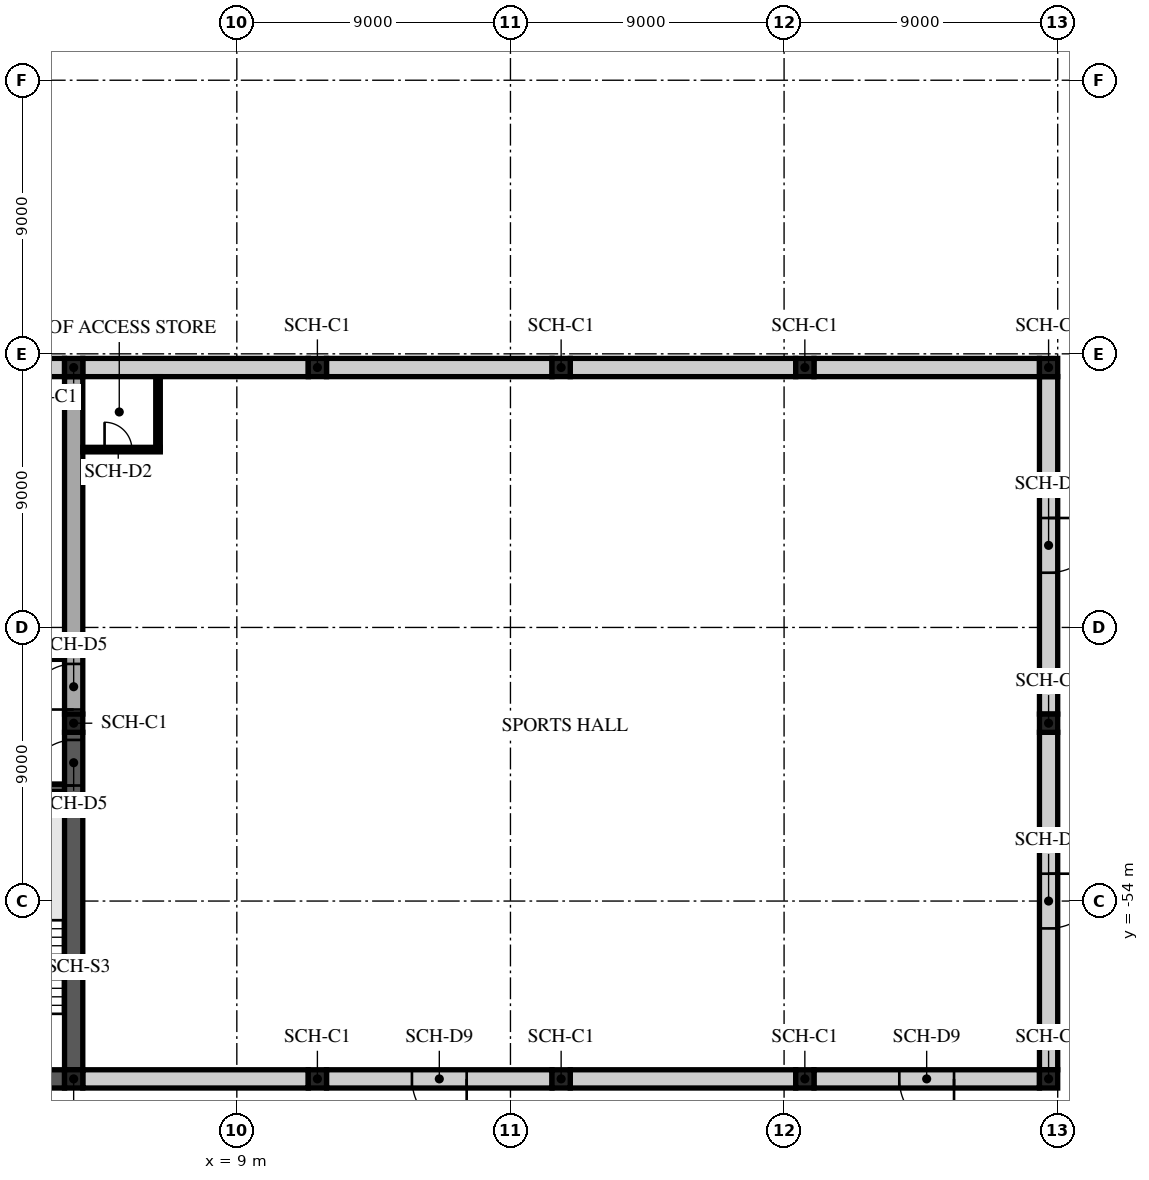
"""IFC4 building model, lengths in metres.
Left out: names, types, materials, properties, quantities, classifications, styles, units other than length and angle.
Written with IfcOpenShell. Run it as: python <this file> out.ifc"""

import sys

from ifc_helpers import new_model, si_unit, direction, frame, frame_2d, origin, origin_2d, place, context, subcontext, project, spatial, rectangle, extrude, element, fill, save


model = new_model("IFC4")
c1 = context("Model", 3, precision=1e-05, world=origin(), true_north=direction((0.0, 1.0)))
c2 = subcontext(c1, "Body", "Model", "MODEL_VIEW")
j1 = project(units=[si_unit("LENGTHUNIT", "METRE"), si_unit("PLANEANGLEUNIT", "RADIAN")], contexts=[c1])
p1 = place(None, origin())
s1 = spatial("IfcSite", under=j1, at=p1, CompositionType="ELEMENT")
p2 = place(p1, origin())
s2 = spatial("IfcBuilding", under=s1, at=p2, CompositionType="ELEMENT")
p3 = place(p2, origin())
s3 = spatial("IfcBuildingStorey", under=s2, at=p3, CompositionType="ELEMENT", Elevation=0.0)
p4 = place(p3, frame((9.0, -34.6, 0.0), z_axis=(0.0, 0.0, 1.0), x_axis=(1.0, 0.0, 0.0)))
e1 = element("IfcColumn", 1, at=p4, inside=s3, PredefinedType="COLUMN", context=c2, shape_type="SweptSolid", body=[
    extrude(rectangle(XDim=0.675, YDim=0.675, at=origin_2d()), origin(), (0.0, 0.0, 1.0), 4.5),
])
p5 = place(p3, frame((9.0, -27.0, 0.0), z_axis=(0.0, 0.0, 1.0), x_axis=(1.0, 0.0, 0.0)))
e2 = element("IfcColumn", 2, at=p5, inside=s3, PredefinedType="COLUMN", context=c2, shape_type="SweptSolid", body=[
    extrude(rectangle(XDim=0.825, YDim=0.825, at=origin_2d()), origin(), (0.0, 0.0, 1.0), 4.5),
])
p6 = place(p3, frame((18.0, -34.6, 0.0), z_axis=(0.0, 0.0, 1.0), x_axis=(1.0, 0.0, 0.0)))
e3 = element("IfcColumn", 3, at=p6, inside=s3, PredefinedType="COLUMN", context=c2, shape_type="SweptSolid", body=[
    extrude(rectangle(XDim=0.725, YDim=0.725, at=origin_2d()), origin(), (0.0, 0.0, 1.0), 4.5),
])
p7 = place(p3, frame((27.0, -34.6, 0.0), z_axis=(0.0, 0.0, 1.0), x_axis=(1.0, 0.0, 0.0)))
e4 = element("IfcColumn", 4, at=p7, inside=s3, PredefinedType="COLUMN", context=c2, shape_type="SweptSolid", body=[
    extrude(rectangle(XDim=0.625, YDim=0.625, at=origin_2d()), origin(), (0.0, 0.0, 1.0), 4.5),
])
p8 = place(p3, frame((27.0, -27.0, 0.0), z_axis=(0.0, 0.0, 1.0), x_axis=(1.0, 0.0, 0.0)))
e5 = element("IfcColumn", 5, at=p8, inside=s3, PredefinedType="COLUMN", context=c2, shape_type="SweptSolid", body=[
    extrude(rectangle(XDim=0.875, YDim=0.875, at=origin_2d()), origin(), (0.0, 0.0, 1.0), 4.5),
])
p9 = place(p3, frame((34.6, -27.0, 0.0), z_axis=(0.0, 0.0, 1.0), x_axis=(1.0, 0.0, 0.0)))
e6 = element("IfcColumn", 6, at=p9, inside=s3, PredefinedType="COLUMN", context=c2, shape_type="SweptSolid", body=[
    extrude(rectangle(XDim=0.7, YDim=0.7, at=origin_2d()), origin(), (0.0, 0.0, 1.0), 4.5),
])
p10 = place(p3, frame((3.681, -27.253, 0.0), z_axis=(0.0, 0.0, 1.0), x_axis=(0.991001197216, 0.133853005627, 0.0)))
e7 = element("IfcColumn", 7, at=p10, inside=s3, PredefinedType="COLUMN", context=c2, shape_type="SweptSolid", body=[
    extrude(rectangle(XDim=1.6, YDim=1.6, at=origin_2d()), origin(), (0.0, 0.0, 1.0), 4.5),
])
p11 = place(p3, frame((17.307, -25.412, 0.0), z_axis=(0.0, 0.0, 1.0), x_axis=(0.991001197216, 0.133853005627, 0.0)))
e8 = element("IfcColumn", 8, at=p11, inside=s3, PredefinedType="COLUMN", context=c2, shape_type="SweptSolid", body=[
    extrude(rectangle(XDim=1.575, YDim=1.575, at=origin_2d()), origin(), (0.0, 0.0, 1.0), 4.5),
])
p12 = place(p3, frame((17.925, -27.0, 0.0), z_axis=(0.0, 0.0, 1.0), x_axis=(1.0, 0.0, 0.0)))
e9 = element("IfcWall", 9, at=p12, inside=s3, PredefinedType="PARTITIONING", context=c2, shape_type="SweptSolid", body=[
    extrude(rectangle(XDim=8.575, YDim=0.15, at=frame_2d((4.288, 0.0))), origin(), (0.0, 0.0, 1.0), 4.1),
])
p13 = place(p12, frame((4.075, 0.0, 0.0)))
e10 = element("IfcOpeningElement", 10, at=p13, cuts=e9, PredefinedType="OPENING", context=c2, shape_type="SweptSolid", body=[
    extrude(rectangle(XDim=1.0, YDim=2.1, at=frame_2d((0.5, 1.05))), frame((0.0, 0.085, 0.0), z_axis=(0.0, -1.0, 0.0), x_axis=(1.0, 0.0, 0.0)), (0.0, 0.0, 1.0), 0.17),
])
p14 = place(p3, frame((27.5, -27.0, 0.0), z_axis=(0.0, 0.0, 1.0), x_axis=(1.0, 0.0, 0.0)))
e11 = element("IfcWall", 11, at=p14, inside=s3, PredefinedType="PARTITIONING", context=c2, shape_type="SweptSolid", body=[
    extrude(rectangle(XDim=6.6, YDim=0.1, at=frame_2d((3.3, 0.0))), origin(), (0.0, 0.0, 1.0), 4.1),
])
p15 = place(p3, frame((35.1, -27.0, 0.0), z_axis=(0.0, 0.0, 1.0), x_axis=(1.0, 0.0, 0.0)))
e12 = element("IfcWall", 12, at=p15, inside=s3, PredefinedType="PARTITIONING", context=c2, shape_type="SweptSolid", body=[
    extrude(rectangle(XDim=0.9, YDim=0.1, at=frame_2d((0.45, 0.0))), origin(), (0.0, 0.0, 1.0), 4.1),
])
p16 = place(p3, frame((13.5, -36.0, 0.0), z_axis=(0.0, 0.0, 1.0), x_axis=(0.0, 1.0, 0.0)))
e13 = element("IfcWall", 13, at=p16, inside=s3, PredefinedType="PARTITIONING", context=c2, shape_type="SweptSolid", body=[
    extrude(rectangle(XDim=17.925, YDim=0.1, at=frame_2d((8.962, 0.0))), origin(), (0.0, 0.0, 1.0), 4.1),
])
p17 = place(p3, frame((18.0, -36.0, 0.0), z_axis=(0.0, 0.0, 1.0), x_axis=(0.0, 1.0, 0.0)))
e14 = element("IfcWall", 14, at=p17, inside=s3, PredefinedType="PARTITIONING", context=c2, shape_type="SweptSolid", body=[
    extrude(rectangle(XDim=0.9, YDim=0.1, at=frame_2d((0.45, 0.0))), origin(), (0.0, 0.0, 1.0), 4.1),
])
p18 = place(p3, frame((18.0, -34.1, 0.0), z_axis=(0.0, 0.0, 1.0), x_axis=(0.0, 1.0, 0.0)))
e15 = element("IfcWall", 15, at=p18, inside=s3, PredefinedType="PARTITIONING", context=c2, shape_type="SweptSolid", body=[
    extrude(rectangle(XDim=7.025, YDim=0.1, at=frame_2d((3.513, 0.0))), origin(), (0.0, 0.0, 1.0), 4.1),
])
p19 = place(p3, frame((18.0, -26.925, 0.0), z_axis=(0.0, 0.0, 1.0), x_axis=(0.0, 1.0, 0.0)))
e16 = element("IfcWall", 16, at=p19, inside=s3, PredefinedType="PARTITIONING", context=c2, shape_type="SweptSolid", body=[
    extrude(rectangle(XDim=0.782, YDim=0.15, at=frame_2d((0.391, 0.0))), origin(), (0.0, 0.0, 1.0), 4.1),
])
p20 = place(p3, frame((27.0, -26.5, 0.0), z_axis=(0.0, 0.0, 1.0), x_axis=(0.0, 1.0, 0.0)))
e17 = element("IfcWall", 17, at=p20, inside=s3, PredefinedType="PARTITIONING", context=c2, shape_type="SweptSolid", body=[
    extrude(rectangle(XDim=4.284, YDim=0.15, at=frame_2d((2.142, 0.0))), origin(), (0.0, 0.0, 1.0), 4.1),
])
for number, where, z_axis, x_axis in (
    (18, (3.633, -59.85, -0.2), (0.0, 0.0, 1.0), (1.0, 0.0, 0.0)),
    (19, (3.633, -48.15, -0.2), (0.0, 0.0, 1.0), (1.0, 0.0, 0.0)),
    (20, (3.633, -36.45, -0.2), (0.0, 0.0, 1.0), (1.0, 0.0, 0.0)),
    (21, (11.65, -59.85, -0.2), (0.0, 0.0, 1.0), (1.0, 0.0, 0.0)),
    (22, (11.65, -36.45, -0.2), (0.0, 0.0, 1.0), (1.0, 0.0, 0.0)),
    (23, (19.667, -59.85, -0.2), (0.0, 0.0, 1.0), (1.0, 0.0, 0.0)),
    (24, (19.667, -36.45, -0.2), (0.0, 0.0, 1.0), (1.0, 0.0, 0.0)),
    (25, (27.683, -59.85, -0.2), (0.0, 0.0, 1.0), (1.0, 0.0, 0.0)),
    (26, (27.683, -36.45, -0.2), (0.0, 0.0, 1.0), (1.0, 0.0, 0.0)),
    (27, (35.7, -59.85, -0.2), (0.0, 0.0, 1.0), (1.0, 0.0, 0.0)),
    (28, (35.7, -48.15, -0.2), (0.0, 0.0, 1.0), (1.0, 0.0, 0.0)),
    (29, (35.7, -36.45, -0.2), (0.0, 0.0, 1.0), (1.0, 0.0, 0.0)),
):
    element("IfcColumn", number, at=place(p3, frame(where, z_axis=z_axis, x_axis=x_axis)), inside=s3, PredefinedType="COLUMN", context=c2, shape_type="SweptSolid", body=[
        extrude(rectangle(XDim=0.6, YDim=0.6, at=origin_2d()), origin(), (0.0, 0.0, 1.0), 4.7),
    ])
p21 = place(p3, frame((-0.772, -50.275, 0.0), z_axis=(0.0, 0.0, 1.0), x_axis=(1.0, 0.0, 0.0)))
e30 = element("IfcWall", 30, at=p21, inside=s3, PredefinedType="SHEAR", context=c2, shape_type="SweptSolid", body=[
    extrude(rectangle(XDim=4.105, YDim=0.25, at=frame_2d((2.052, 0.0))), origin(), (0.0, 0.0, 1.0), 4.1),
])
p22 = place(p3, frame((-1.233, -45.975, 0.0), z_axis=(0.0, 0.0, 1.0), x_axis=(1.0, 0.0, 0.0)))
e31 = element("IfcWall", 31, at=p22, inside=s3, PredefinedType="PARTITIONING", context=c2, shape_type="SweptSolid", body=[
    extrude(rectangle(XDim=4.566, YDim=0.15, at=frame_2d((2.283, 0.0))), origin(), (0.0, 0.0, 1.0), 4.1),
])
p23 = place(p22, frame((1.87, 0.0, 0.0)))
e32 = element("IfcOpeningElement", 32, at=p23, cuts=e31, PredefinedType="OPENING", context=c2, shape_type="SweptSolid", body=[
    extrude(rectangle(XDim=0.9, YDim=2.1, at=frame_2d((0.45, 1.05))), frame((0.0, 0.085, 0.0), z_axis=(0.0, -1.0, 0.0), x_axis=(1.0, 0.0, 0.0)), (0.0, 0.0, 1.0), 0.17),
])
p24 = place(p3, frame((-4.083, -36.45, -0.2), z_axis=(0.0, 0.0, 1.0), x_axis=(1.0, 0.0, 0.0)))
e33 = element("IfcWall", 33, at=p24, inside=s3, PredefinedType="STANDARD", context=c2, shape_type="SweptSolid", body=[
    extrude(rectangle(XDim=7.417, YDim=0.6, at=frame_2d((3.708, 0.0))), origin(), (0.0, 0.0, 1.0), 4.3),
])
for number, where, z_axis, x_axis in (
    (34, (3.933, -36.45, -0.2), (0.0, 0.0, 1.0), (1.0, 0.0, 0.0)),
    (35, (11.95, -36.45, -0.2), (0.0, 0.0, 1.0), (1.0, 0.0, 0.0)),
):
    element("IfcWall", number, at=place(p3, frame(where, z_axis=z_axis, x_axis=x_axis)), inside=s3, PredefinedType="SOLIDWALL", context=c2, shape_type="SweptSolid", body=[
        extrude(rectangle(XDim=7.417, YDim=0.6, at=frame_2d((3.708, 0.0))), origin(), (0.0, 0.0, 1.0), 4.7),
    ])
for number, where, z_axis, x_axis in (
    (36, (19.967, -36.45, -0.2), (0.0, 0.0, 1.0), (1.0, 0.0, 0.0)),
    (37, (27.983, -36.45, -0.2), (0.0, 0.0, 1.0), (1.0, 0.0, 0.0)),
):
    element("IfcWall", number, at=place(p3, frame(where, z_axis=z_axis, x_axis=x_axis)), inside=s3, PredefinedType="SOLIDWALL", context=c2, shape_type="SweptSolid", body=[
        extrude(rectangle(XDim=7.417, YDim=0.6, at=frame_2d((3.708, 0.0))), origin(), (0.0, 0.0, 1.0), 4.7),
    ])
p25 = place(p3, frame((35.7, -36.75, -0.2), z_axis=(0.0, 0.0, 1.0), x_axis=(0.0, -1.0, 0.0)))
e38 = element("IfcWall", 38, at=p25, inside=s3, PredefinedType="SOLIDWALL", context=c2, shape_type="SweptSolid", body=[
    extrude(rectangle(XDim=11.1, YDim=0.6, at=frame_2d((5.55, 0.0))), origin(), (0.0, 0.0, 1.0), 4.7),
])
p26 = place(p25, frame((4.65, 0.0, 0.2)))
e39 = element("IfcOpeningElement", 39, at=p26, cuts=e38, PredefinedType="OPENING", context=c2, shape_type="SweptSolid", body=[
    extrude(rectangle(XDim=1.8, YDim=2.4, at=frame_2d((0.9, 1.2))), frame((0.0, 0.31, 0.0), z_axis=(0.0, -1.0, 0.0), x_axis=(1.0, 0.0, 0.0)), (0.0, 0.0, 1.0), 0.62),
])
p27 = place(p3, frame((35.7, -48.45, -0.2), z_axis=(0.0, 0.0, 1.0), x_axis=(0.0, -1.0, 0.0)))
e40 = element("IfcWall", 40, at=p27, inside=s3, PredefinedType="SOLIDWALL", context=c2, shape_type="SweptSolid", body=[
    extrude(rectangle(XDim=11.1, YDim=0.6, at=frame_2d((5.55, 0.0))), origin(), (0.0, 0.0, 1.0), 4.7),
])
p28 = place(p27, frame((4.65, 0.0, 0.2)))
e41 = element("IfcOpeningElement", 41, at=p28, cuts=e40, PredefinedType="OPENING", context=c2, shape_type="SweptSolid", body=[
    extrude(rectangle(XDim=1.8, YDim=2.4, at=frame_2d((0.9, 1.2))), frame((0.0, 0.31, 0.0), z_axis=(0.0, -1.0, 0.0), x_axis=(1.0, 0.0, 0.0)), (0.0, 0.0, 1.0), 0.62),
])
p29 = place(p3, frame((35.4, -59.85, -0.2), z_axis=(0.0, 0.0, 1.0), x_axis=(-1.0, 0.0, 0.0)))
e42 = element("IfcWall", 42, at=p29, inside=s3, PredefinedType="SOLIDWALL", context=c2, shape_type="SweptSolid", body=[
    extrude(rectangle(XDim=7.417, YDim=0.6, at=frame_2d((3.708, 0.0))), origin(), (0.0, 0.0, 1.0), 4.7),
])
p30 = place(p29, frame((2.81, 0.0, 0.2)))
e43 = element("IfcOpeningElement", 43, at=p30, cuts=e42, PredefinedType="OPENING", context=c2, shape_type="SweptSolid", body=[
    extrude(rectangle(XDim=1.8, YDim=2.4, at=frame_2d((0.9, 1.2))), frame((0.0, 0.31, 0.0), z_axis=(0.0, -1.0, 0.0), x_axis=(1.0, 0.0, 0.0)), (0.0, 0.0, 1.0), 0.62),
])
p31 = place(p3, frame((27.383, -59.85, -0.2), z_axis=(0.0, 0.0, 1.0), x_axis=(-1.0, 0.0, 0.0)))
e44 = element("IfcWall", 44, at=p31, inside=s3, PredefinedType="SOLIDWALL", context=c2, shape_type="SweptSolid", body=[
    extrude(rectangle(XDim=7.417, YDim=0.6, at=frame_2d((3.708, 0.0))), origin(), (0.0, 0.0, 1.0), 4.7),
])
p32 = place(p3, frame((19.367, -59.85, -0.2), z_axis=(0.0, 0.0, 1.0), x_axis=(-1.0, 0.0, 0.0)))
e45 = element("IfcWall", 45, at=p32, inside=s3, PredefinedType="SOLIDWALL", context=c2, shape_type="SweptSolid", body=[
    extrude(rectangle(XDim=7.417, YDim=0.6, at=frame_2d((3.708, 0.0))), origin(), (0.0, 0.0, 1.0), 4.7),
])
p33 = place(p32, frame((2.807, 0.0, 0.2)))
e46 = element("IfcOpeningElement", 46, at=p33, cuts=e45, PredefinedType="OPENING", context=c2, shape_type="SweptSolid", body=[
    extrude(rectangle(XDim=1.8, YDim=2.4, at=frame_2d((0.9, 1.2))), frame((0.0, 0.31, 0.0), z_axis=(0.0, -1.0, 0.0), x_axis=(1.0, 0.0, 0.0)), (0.0, 0.0, 1.0), 0.62),
])
p34 = place(p3, frame((11.35, -59.85, -0.2), z_axis=(0.0, 0.0, 1.0), x_axis=(-1.0, 0.0, 0.0)))
e47 = element("IfcWall", 47, at=p34, inside=s3, PredefinedType="SOLIDWALL", context=c2, shape_type="SweptSolid", body=[
    extrude(rectangle(XDim=7.417, YDim=0.6, at=frame_2d((3.708, 0.0))), origin(), (0.0, 0.0, 1.0), 4.7),
])
p35 = place(p3, frame((3.333, -59.85, -0.2), z_axis=(0.0, 0.0, 1.0), x_axis=(-1.0, 0.0, 0.0)))
e48 = element("IfcWall", 48, at=p35, inside=s3, PredefinedType="STANDARD", context=c2, shape_type="SweptSolid", body=[
    extrude(rectangle(XDim=7.417, YDim=0.6, at=frame_2d((3.708, 0.0))), origin(), (0.0, 0.0, 1.0), 4.3),
])
p36 = place(p35, frame((1.39, 0.0, 0.2)))
e49 = element("IfcOpeningElement", 49, at=p36, cuts=e48, PredefinedType="OPENING", context=c2, shape_type="SweptSolid", body=[
    extrude(rectangle(XDim=1.2, YDim=2.1, at=frame_2d((0.6, 1.05))), frame((0.0, 0.31, 0.0), z_axis=(0.0, -1.0, 0.0), x_axis=(1.0, 0.0, 0.0)), (0.0, 0.0, 1.0), 0.62),
])
p37 = place(p3, frame((3.633, -59.55, -0.2), z_axis=(0.0, 0.0, 1.0), x_axis=(0.0, 1.0, 0.0)))
e50 = element("IfcWall", 50, at=p37, inside=s3, PredefinedType="SOLIDWALL", context=c2, shape_type="SweptSolid", body=[
    extrude(rectangle(XDim=11.1, YDim=0.6, at=frame_2d((5.55, 0.0))), origin(), (0.0, 0.0, 1.0), 4.7),
])
p38 = place(p37, frame((9.35, 0.0, 0.2)))
e51 = element("IfcOpeningElement", 51, at=p38, cuts=e50, PredefinedType="OPENING", context=c2, shape_type="SweptSolid", body=[
    extrude(rectangle(XDim=1.5, YDim=2.4, at=frame_2d((0.75, 1.2))), frame((0.0, 0.31, 0.0), z_axis=(0.0, -1.0, 0.0), x_axis=(1.0, 0.0, 0.0)), (0.0, 0.0, 1.0), 0.62),
])
p39 = place(p3, frame((3.633, -47.85, -0.2), z_axis=(0.0, 0.0, 1.0), x_axis=(0.0, 1.0, 0.0)))
e52 = element("IfcWall", 52, at=p39, inside=s3, PredefinedType="SOLIDWALL", context=c2, shape_type="SweptSolid", body=[
    extrude(rectangle(XDim=11.1, YDim=0.6, at=frame_2d((5.55, 0.0))), origin(), (0.0, 0.0, 1.0), 4.7),
])
p40 = place(p39, frame((0.15, 0.0, 0.2)))
e53 = element("IfcOpeningElement", 53, at=p40, cuts=e52, PredefinedType="OPENING", context=c2, shape_type="SweptSolid", body=[
    extrude(rectangle(XDim=1.5, YDim=2.4, at=frame_2d((0.75, 1.2))), frame((0.0, 0.31, 0.0), z_axis=(0.0, -1.0, 0.0), x_axis=(1.0, 0.0, 0.0)), (0.0, 0.0, 1.0), 0.62),
])
p41 = place(p3, frame((3.933, -39.15, 0.0), z_axis=(0.0, 0.0, 1.0), x_axis=(1.0, 0.0, 0.0)))
e54 = element("IfcWall", 54, at=p41, inside=s3, PredefinedType="SHEAR", context=c2, shape_type="SweptSolid", body=[
    extrude(rectangle(XDim=2.55, YDim=0.15, at=frame_2d((1.275, 0.0))), origin(), (0.0, 0.0, 1.0), 4.5),
])
p42 = place(p41, frame((0.717, 0.0, 0.0)))
e55 = element("IfcOpeningElement", 55, at=p42, cuts=e54, PredefinedType="OPENING", context=c2, shape_type="SweptSolid", body=[
    extrude(rectangle(XDim=0.9, YDim=2.1, at=frame_2d((0.45, 1.05))), frame((0.0, 0.085, 0.0), z_axis=(0.0, -1.0, 0.0), x_axis=(1.0, 0.0, 0.0)), (0.0, 0.0, 1.0), 0.17),
])
p43 = place(p3, frame((6.408, -39.15, 0.0), z_axis=(0.0, 0.0, 1.0), x_axis=(0.0, 1.0, 0.0)))
e56 = element("IfcWall", 56, at=p43, inside=s3, PredefinedType="SHEAR", context=c2, shape_type="SweptSolid", body=[
    extrude(rectangle(XDim=2.4, YDim=0.15, at=frame_2d((1.2, 0.0))), origin(), (0.0, 0.0, 1.0), 4.5),
])
p44 = place(p3, frame((-30.876, -35.7, 0.0), z_axis=(0.0, 0.0, 1.0), x_axis=(1.0, 0.0, 0.0)))
e57 = element("IfcWall", 57, at=p44, inside=s3, PredefinedType="STANDARD", context=c2, shape_type="SweptSolid", body=[
    extrude(rectangle(XDim=61.751, YDim=0.6, at=frame_2d((30.876, 0.0))), origin(), (0.0, 0.0, 1.0), 4.1),
])
p45 = place(p3, frame((30.876, -35.7, 0.0), z_axis=(0.0, 0.0, 1.0), x_axis=(0.707106781187, 0.707106781187, 0.0)))
e58 = element("IfcWall", 58, at=p45, inside=s3, PredefinedType="STANDARD", context=c2, shape_type="SweptSolid", body=[
    extrude(rectangle(XDim=6.823, YDim=0.6, at=frame_2d((3.411, 0.0))), origin(), (0.0, 0.0, 1.0), 4.1),
])
p46 = place(p3, frame((35.7, -30.876, 0.0), z_axis=(0.0, 0.0, 1.0), x_axis=(0.0, 1.0, 0.0)))
e59 = element("IfcWall", 59, at=p46, inside=s3, PredefinedType="STANDARD", context=c2, shape_type="SweptSolid", body=[
    extrude(rectangle(XDim=6.676, YDim=0.6, at=frame_2d((3.338, 0.0))), origin(), (0.0, 0.0, 1.0), 4.1),
])
p47 = place(p46, frame((1.152, 0.0, 0.45)))
e60 = element("IfcOpeningElement", 60, at=p47, cuts=e59, PredefinedType="OPENING", context=c2, shape_type="SweptSolid", body=[
    extrude(rectangle(XDim=2.0, YDim=3.2, at=frame_2d((1.0, 1.6))), frame((0.0, 0.31, 0.0), z_axis=(0.0, -1.0, 0.0), x_axis=(1.0, 0.0, 0.0)), (0.0, 0.0, 1.0), 0.62),
])
p48 = place(p13, origin())
e61 = element("IfcDoor", 61, at=p48, inside=s3, OperationType="SINGLE_SWING_LEFT", PredefinedType="DOOR", context=c2, shape_type="SweptSolid", body=[
    extrude(rectangle(XDim=1.0, YDim=2.1, at=frame_2d((0.5, 1.05))), frame((0.0, 0.025, 0.0), z_axis=(0.0, -1.0, 0.0), x_axis=(1.0, 0.0, 0.0)), (0.0, 0.0, 1.0), 0.05),
])
fill(e10, e61)
p49 = place(p28, origin())
e62 = element("IfcDoor", 62, at=p49, inside=s3, OperationType="DOUBLE_DOOR_SINGLE_SWING", PredefinedType="DOOR", context=c2, shape_type="SweptSolid", body=[
    extrude(rectangle(XDim=1.8, YDim=2.4, at=frame_2d((0.9, 1.2))), frame((0.0, 0.025, 0.0), z_axis=(0.0, -1.0, 0.0), x_axis=(1.0, 0.0, 0.0)), (0.0, 0.0, 1.0), 0.05),
])
fill(e41, e62)
p50 = place(p26, origin())
e63 = element("IfcDoor", 63, at=p50, inside=s3, OperationType="DOUBLE_DOOR_SINGLE_SWING", PredefinedType="DOOR", context=c2, shape_type="SweptSolid", body=[
    extrude(rectangle(XDim=1.8, YDim=2.4, at=frame_2d((0.9, 1.2))), frame((0.0, 0.025, 0.0), z_axis=(0.0, -1.0, 0.0), x_axis=(1.0, 0.0, 0.0)), (0.0, 0.0, 1.0), 0.05),
])
fill(e39, e63)
p51 = place(p33, origin())
e64 = element("IfcDoor", 64, at=p51, inside=s3, OperationType="DOUBLE_DOOR_SINGLE_SWING", PredefinedType="DOOR", context=c2, shape_type="SweptSolid", body=[
    extrude(rectangle(XDim=1.8, YDim=2.4, at=frame_2d((0.9, 1.2))), frame((0.0, 0.025, 0.0), z_axis=(0.0, -1.0, 0.0), x_axis=(1.0, 0.0, 0.0)), (0.0, 0.0, 1.0), 0.05),
])
fill(e46, e64)
p52 = place(p30, origin())
e65 = element("IfcDoor", 65, at=p52, inside=s3, OperationType="DOUBLE_DOOR_SINGLE_SWING", PredefinedType="DOOR", context=c2, shape_type="SweptSolid", body=[
    extrude(rectangle(XDim=1.8, YDim=2.4, at=frame_2d((0.9, 1.2))), frame((0.0, 0.025, 0.0), z_axis=(0.0, -1.0, 0.0), x_axis=(1.0, 0.0, 0.0)), (0.0, 0.0, 1.0), 0.05),
])
fill(e43, e65)
p53 = place(p38, origin())
e66 = element("IfcDoor", 66, at=p53, inside=s3, OperationType="DOUBLE_DOOR_SINGLE_SWING", PredefinedType="DOOR", context=c2, shape_type="SweptSolid", body=[
    extrude(rectangle(XDim=1.5, YDim=2.4, at=frame_2d((0.75, 1.2))), frame((0.0, 0.025, 0.0), z_axis=(0.0, -1.0, 0.0), x_axis=(1.0, 0.0, 0.0)), (0.0, 0.0, 1.0), 0.05),
])
fill(e51, e66)
p54 = place(p40, origin())
e67 = element("IfcDoor", 67, at=p54, inside=s3, OperationType="DOUBLE_DOOR_SINGLE_SWING", PredefinedType="DOOR", context=c2, shape_type="SweptSolid", body=[
    extrude(rectangle(XDim=1.5, YDim=2.4, at=frame_2d((0.75, 1.2))), frame((0.0, 0.025, 0.0), z_axis=(0.0, -1.0, 0.0), x_axis=(1.0, 0.0, 0.0)), (0.0, 0.0, 1.0), 0.05),
])
fill(e53, e67)
p55 = place(p42, origin())
e68 = element("IfcDoor", 68, at=p55, inside=s3, OperationType="SINGLE_SWING_LEFT", PredefinedType="DOOR", context=c2, shape_type="SweptSolid", body=[
    extrude(rectangle(XDim=0.9, YDim=2.1, at=frame_2d((0.45, 1.05))), frame((0.0, 0.025, 0.0), z_axis=(0.0, -1.0, 0.0), x_axis=(1.0, 0.0, 0.0)), (0.0, 0.0, 1.0), 0.05),
])
fill(e55, e68)
p56 = place(p47, origin())
e69 = element("IfcWindow", 69, at=p56, inside=s3, PartitioningType="SINGLE_PANEL", PredefinedType="WINDOW", context=c2, shape_type="SweptSolid", body=[
    extrude(rectangle(XDim=2.0, YDim=3.2, at=frame_2d((1.0, 1.6))), frame((0.0, 0.03, 0.0), z_axis=(0.0, -1.0, 0.0), x_axis=(1.0, 0.0, 0.0)), (0.0, 0.0, 1.0), 0.06),
])
fill(e60, e69)
save(model, sys.argv[1])
